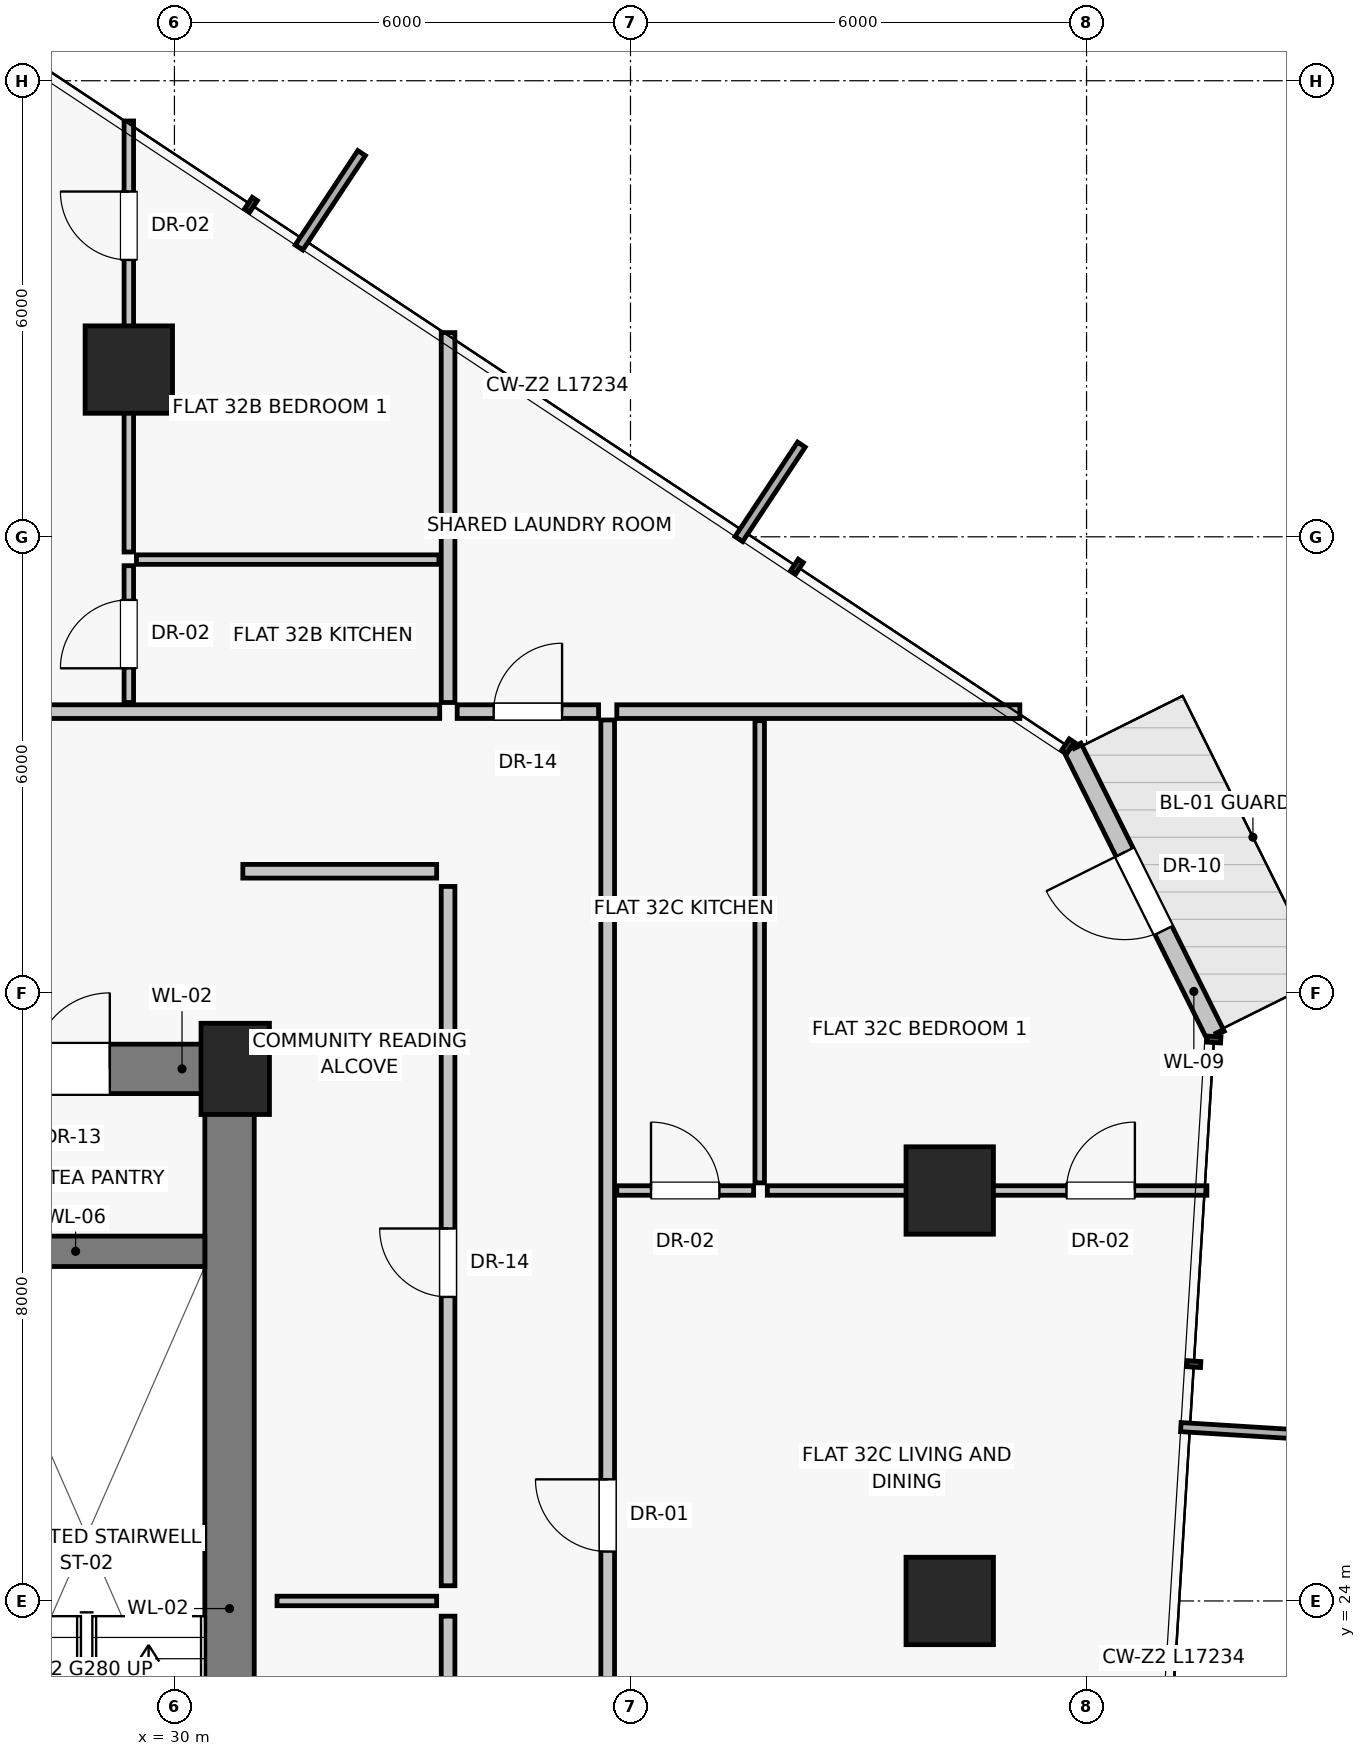
"""IFC4 building model, lengths in metres.
Left out: names, types, materials, properties, quantities, classifications, styles, units other than length and angle.
Written with IfcOpenShell. Run it as: python <this file> out.ifc"""

import sys

from ifc_helpers import new_model, si_unit, direction, frame, frame_2d, origin, origin_2d, place, context, subcontext, project, spatial, rectangle, extrude, source, transform, mapped, element, fill, save


model = new_model("IFC4")
c1 = context("Model", 3, precision=1e-05, world=origin(), true_north=direction((0.0, 1.0)))
c2 = subcontext(c1, "Body", "Model", "MODEL_VIEW")
j1 = project(units=[si_unit("LENGTHUNIT", "METRE"), si_unit("PLANEANGLEUNIT", "RADIAN")], contexts=[c1])
p1 = place(None, origin())
s1 = spatial("IfcSite", under=j1, at=p1, CompositionType="ELEMENT")
p2 = place(p1, origin())
s2 = spatial("IfcBuilding", under=s1, at=p2, CompositionType="ELEMENT")
p3 = place(p2, frame((0.0, 0.0, 116.5)))
s3 = spatial("IfcBuildingStorey", under=s2, at=p3, CompositionType="ELEMENT", Elevation=116.5)
p4 = place(p3, frame((30.8, 31.0, 0.0), z_axis=(0.0, 0.0, 1.0), x_axis=(1.0, 0.0, 0.0)))
e1 = element("IfcColumn", 1, at=p4, inside=s3, PredefinedType="PILASTER", context=c2, shape_type="SweptSolid", body=[
    extrude(rectangle(XDim=0.9, YDim=1.2, at=origin_2d()), origin(), (0.0, 0.0, 1.0), 3.25),
])
for number, where, z_axis, x_axis in (
    (2, (40.2, 24.0, 0.0), (0.0, 0.0, 1.0), (1.0, 0.0, 0.0)),
    (3, (40.2, 29.4, 0.0), (0.0, 0.0, 1.0), (1.0, 0.0, 0.0)),
    (4, (29.4, 40.2, 0.0), (0.0, 0.0, 1.0), (1.0, 0.0, 0.0)),
):
    element("IfcColumn", number, at=place(p3, frame(where, z_axis=z_axis, x_axis=x_axis)), inside=s3, PredefinedType="COLUMN", context=c2, shape_type="SweptSolid", body=[
        extrude(rectangle(XDim=1.15, YDim=1.15, at=origin_2d()), origin(), (0.0, 0.0, 1.0), 3.25),
    ])
p5 = place(p3, frame((43.699, 31.44, 0.0), z_axis=(0.0, 0.0, 1.0), x_axis=(-0.445597963256, 0.895233184786, 0.0)))
e5 = element("IfcWall", 5, at=p5, inside=s3, PredefinedType="SOLIDWALL", context=c2, shape_type="SweptSolid", body=[
    extrude(rectangle(XDim=4.233, YDim=0.25, at=frame_2d((2.116, 0.0))), origin(), (0.0, 0.0, 1.0), 3.0),
])
p6 = place(p5, frame((1.542, 0.0, 0.0)))
e6 = element("IfcOpeningElement", 6, at=p6, cuts=e5, PredefinedType="OPENING", context=c2, shape_type="SweptSolid", body=[
    extrude(rectangle(XDim=1.15, YDim=2.25, at=frame_2d((0.575, 1.125))), frame((0.0, 0.135, 0.0), z_axis=(0.0, -1.0, 0.0), x_axis=(1.0, 0.0, 0.0)), (0.0, 0.0, 1.0), 0.27),
])
p7 = place(p3, frame((30.725, 16.8, 0.0), z_axis=(0.0, 0.0, 1.0), x_axis=(0.0, 1.0, 0.0)))
e7 = element("IfcWall", 7, at=p7, inside=s3, PredefinedType="SHEAR", context=c2, shape_type="SweptSolid", body=[
    extrude(rectangle(XDim=14.2, YDim=0.65, at=frame_2d((7.1, 0.0))), origin(), (0.0, 0.0, 1.0), 3.0),
])
p8 = place(p3, frame((27.0, 31.0, 0.0), z_axis=(0.0, 0.0, 1.0), x_axis=(1.0, 0.0, 0.0)))
e8 = element("IfcWall", 8, at=p8, inside=s3, PredefinedType="SHEAR", context=c2, shape_type="SweptSolid", body=[
    extrude(rectangle(XDim=3.8, YDim=0.65, at=frame_2d((1.9, 0.0))), origin(), (0.0, 0.0, 1.0), 3.0),
])
p9 = place(p8, frame((1.15, 0.0, 0.0)))
e9 = element("IfcOpeningElement", 9, at=p9, cuts=e8, PredefinedType="OPENING", context=c2, shape_type="SweptSolid", body=[
    extrude(rectangle(XDim=1.0, YDim=2.01, at=frame_2d((0.5, 1.005))), frame((0.0, 0.335, 0.0), z_axis=(0.0, -1.0, 0.0), x_axis=(1.0, 0.0, 0.0)), (0.0, 0.0, 1.0), 0.67),
])
p10 = place(p3, frame((27.0, 28.6, 0.0), z_axis=(0.0, 0.0, 1.0), x_axis=(1.0, 0.0, 0.0)))
e10 = element("IfcWall", 10, at=p10, inside=s3, PredefinedType="SHEAR", context=c2, shape_type="SweptSolid", body=[
    extrude(rectangle(XDim=3.4, YDim=0.4, at=frame_2d((1.7, 0.0))), origin(), (0.0, 0.0, 1.0), 3.0),
])
p11 = place(p3, frame((33.6, 14.4, 0.0), z_axis=(0.0, 0.0, 1.0), x_axis=(0.0, 1.0, 0.0)))
e11 = element("IfcWall", 11, at=p11, inside=s3, PredefinedType="PARTITIONING", context=c2, shape_type="SweptSolid", body=[
    extrude(rectangle(XDim=9.4, YDim=0.18, at=frame_2d((4.7, 0.0))), origin(), (0.0, 0.0, 1.0), 3.0),
])
p12 = place(p11, frame((3.8, 0.0, 0.0)))
e12 = element("IfcOpeningElement", 12, at=p12, cuts=e11, PredefinedType="OPENING", context=c2, shape_type="SweptSolid", body=[
    extrude(rectangle(XDim=0.9, YDim=2.01, at=frame_2d((0.45, 1.005))), frame((0.0, 0.1, 0.0), z_axis=(0.0, -1.0, 0.0), x_axis=(1.0, 0.0, 0.0)), (0.0, 0.0, 1.0), 0.2),
])
p13 = place(p3, frame((33.6, 24.2, 0.0), z_axis=(0.0, 0.0, 1.0), x_axis=(0.0, 1.0, 0.0)))
e13 = element("IfcWall", 13, at=p13, inside=s3, PredefinedType="PARTITIONING", context=c2, shape_type="SweptSolid", body=[
    extrude(rectangle(XDim=9.2, YDim=0.18, at=frame_2d((4.6, 0.0))), origin(), (0.0, 0.0, 1.0), 3.0),
])
p14 = place(p13, frame((3.8, 0.0, 0.0)))
e14 = element("IfcOpeningElement", 14, at=p14, cuts=e13, PredefinedType="OPENING", context=c2, shape_type="SweptSolid", body=[
    extrude(rectangle(XDim=0.9, YDim=2.01, at=frame_2d((0.45, 1.005))), frame((0.0, 0.1, 0.0), z_axis=(0.0, -1.0, 0.0), x_axis=(1.0, 0.0, 0.0)), (0.0, 0.0, 1.0), 0.2),
])
p15 = place(p3, frame((31.35, 24.0, 0.0), z_axis=(0.0, 0.0, 1.0), x_axis=(1.0, 0.0, 0.0)))
e15 = element("IfcWall", 15, at=p15, inside=s3, PredefinedType="PARTITIONING", context=c2, shape_type="SweptSolid", body=[
    extrude(rectangle(XDim=2.1, YDim=0.125, at=frame_2d((1.05, 0.0))), origin(), (0.0, 0.0, 1.0), 3.0),
])
p16 = place(p3, frame((30.9, 33.6, 0.0), z_axis=(0.0, 0.0, 1.0), x_axis=(1.0, 0.0, 0.0)))
e16 = element("IfcWall", 16, at=p16, inside=s3, PredefinedType="PARTITIONING", context=c2, shape_type="SweptSolid", body=[
    extrude(rectangle(XDim=2.55, YDim=0.18, at=frame_2d((1.275, 0.0))), origin(), (0.0, 0.0, 1.0), 3.0),
])
p17 = place(p3, frame((33.6, 35.82, 0.0), z_axis=(0.0, 0.0, 1.0), x_axis=(0.0, 1.0, 0.0)))
e17 = element("IfcWall", 17, at=p17, inside=s3, PredefinedType="PARTITIONING", context=c2, shape_type="SweptSolid", body=[
    extrude(rectangle(XDim=4.866, YDim=0.18, at=frame_2d((2.433, 0.0))), origin(), (0.0, 0.0, 1.0), 3.0),
])
p18 = place(p3, frame((18.71, 35.7, 0.0), z_axis=(0.0, 0.0, 1.0), x_axis=(1.0, 0.0, 0.0)))
e18 = element("IfcWall", 18, at=p18, inside=s3, PredefinedType="PARTITIONING", context=c2, shape_type="SweptSolid", body=[
    extrude(rectangle(XDim=14.78, YDim=0.18, at=frame_2d((7.39, 0.0))), origin(), (0.0, 0.0, 1.0), 2.58),
])
p19 = place(p18, frame((5.94, 0.0, 0.0)))
e19 = element("IfcOpeningElement", 19, at=p19, cuts=e18, PredefinedType="OPENING", context=c2, shape_type="SweptSolid", body=[
    extrude(rectangle(XDim=0.95, YDim=2.02, at=frame_2d((0.475, 1.01))), frame((0.0, 0.1, 0.0), z_axis=(0.0, -1.0, 0.0), x_axis=(1.0, 0.0, 0.0)), (0.0, 0.0, 1.0), 0.2),
])
p20 = place(p3, frame((29.4, 35.82, 0.0), z_axis=(0.0, 0.0, 1.0), x_axis=(0.0, 1.0, 0.0)))
e20 = element("IfcWall", 20, at=p20, inside=s3, PredefinedType="PARTITIONING", context=c2, shape_type="SweptSolid", body=[
    extrude(rectangle(XDim=1.8, YDim=0.125, at=frame_2d((0.9, 0.0))), origin(), (0.0, 0.0, 1.0), 2.378),
])
p21 = place(p20, frame((0.45, 0.0, 0.0)))
e21 = element("IfcOpeningElement", 21, at=p21, cuts=e20, PredefinedType="OPENING", context=c2, shape_type="SweptSolid", body=[
    extrude(rectangle(XDim=0.9, YDim=2.01, at=frame_2d((0.45, 1.005))), frame((0.0, 0.073, 0.0), z_axis=(0.0, -1.0, 0.0), x_axis=(1.0, 0.0, 0.0)), (0.0, 0.0, 1.0), 0.145),
])
p22 = place(p3, frame((29.5, 37.7, 0.0), z_axis=(0.0, 0.0, 1.0), x_axis=(1.0, 0.0, 0.0)))
e22 = element("IfcWall", 22, at=p22, inside=s3, PredefinedType="PARTITIONING", context=c2, shape_type="SweptSolid", body=[
    extrude(rectangle(XDim=3.98, YDim=0.125, at=frame_2d((1.99, 0.0))), origin(), (0.0, 0.0, 1.0), 3.0),
])
p23 = place(p3, frame((29.4, 37.8, 0.0), z_axis=(0.0, 0.0, 1.0), x_axis=(0.0, 1.0, 0.0)))
e23 = element("IfcWall", 23, at=p23, inside=s3, PredefinedType="PARTITIONING", context=c2, shape_type="SweptSolid", body=[
    extrude(rectangle(XDim=5.671, YDim=0.125, at=frame_2d((2.835, 0.0))), origin(), (0.0, 0.0, 1.0), 2.378),
])
p24 = place(p23, frame((3.842, 0.0, 0.0)))
e24 = element("IfcOpeningElement", 24, at=p24, cuts=e23, PredefinedType="OPENING", context=c2, shape_type="SweptSolid", body=[
    extrude(rectangle(XDim=0.9, YDim=2.01, at=frame_2d((0.45, 1.005))), frame((0.0, 0.073, 0.0), z_axis=(0.0, -1.0, 0.0), x_axis=(1.0, 0.0, 0.0)), (0.0, 0.0, 1.0), 0.145),
])
p25 = place(p3, frame((35.82, 35.7, 0.0), z_axis=(0.0, 0.0, 1.0), x_axis=(1.0, 0.0, 0.0)))
e25 = element("IfcWall", 25, at=p25, inside=s3, PredefinedType="PARTITIONING", context=c2, shape_type="SweptSolid", body=[
    extrude(rectangle(XDim=5.302, YDim=0.18, at=frame_2d((2.651, 0.0))), origin(), (0.0, 0.0, 1.0), 3.0),
])
p26 = place(p3, frame((35.7, 18.71, 0.0), z_axis=(0.0, 0.0, 1.0), x_axis=(0.0, 1.0, 0.0)))
e26 = element("IfcWall", 26, at=p26, inside=s3, PredefinedType="PARTITIONING", context=c2, shape_type="SweptSolid", body=[
    extrude(rectangle(XDim=16.88, YDim=0.18, at=frame_2d((8.44, 0.0))), origin(), (0.0, 0.0, 1.0), 2.58),
])
p27 = place(p26, frame((5.94, 0.0, 0.0)))
e27 = element("IfcOpeningElement", 27, at=p27, cuts=e26, PredefinedType="OPENING", context=c2, shape_type="SweptSolid", body=[
    extrude(rectangle(XDim=0.95, YDim=2.02, at=frame_2d((0.475, 1.01))), frame((0.0, 0.1, 0.0), z_axis=(0.0, -1.0, 0.0), x_axis=(1.0, 0.0, 0.0)), (0.0, 0.0, 1.0), 0.2),
])
p28 = place(p3, frame((35.82, 29.4, 0.0), z_axis=(0.0, 0.0, 1.0), x_axis=(1.0, 0.0, 0.0)))
e28 = element("IfcWall", 28, at=p28, inside=s3, PredefinedType="PARTITIONING", context=c2, shape_type="SweptSolid", body=[
    extrude(rectangle(XDim=1.8, YDim=0.125, at=frame_2d((0.9, 0.0))), origin(), (0.0, 0.0, 1.0), 2.378),
])
p29 = place(p28, frame((0.45, 0.0, 0.0)))
e29 = element("IfcOpeningElement", 29, at=p29, cuts=e28, PredefinedType="OPENING", context=c2, shape_type="SweptSolid", body=[
    extrude(rectangle(XDim=0.9, YDim=2.01, at=frame_2d((0.45, 1.005))), frame((0.0, 0.073, 0.0), z_axis=(0.0, -1.0, 0.0), x_axis=(1.0, 0.0, 0.0)), (0.0, 0.0, 1.0), 0.145),
])
p30 = place(p3, frame((37.7, 29.5, 0.0), z_axis=(0.0, 0.0, 1.0), x_axis=(0.0, 1.0, 0.0)))
e30 = element("IfcWall", 30, at=p30, inside=s3, PredefinedType="PARTITIONING", context=c2, shape_type="SweptSolid", body=[
    extrude(rectangle(XDim=6.08, YDim=0.125, at=frame_2d((3.04, 0.0))), origin(), (0.0, 0.0, 1.0), 3.0),
])
p31 = place(p3, frame((37.8, 29.4, 0.0), z_axis=(0.0, 0.0, 1.0), x_axis=(1.0, 0.0, 0.0)))
e31 = element("IfcWall", 31, at=p31, inside=s3, PredefinedType="PARTITIONING", context=c2, shape_type="SweptSolid", body=[
    extrude(rectangle(XDim=5.783, YDim=0.125, at=frame_2d((2.892, 0.0))), origin(), (0.0, 0.0, 1.0), 2.378),
])
p32 = place(p31, frame((3.936, 0.0, 0.0)))
e32 = element("IfcOpeningElement", 32, at=p32, cuts=e31, PredefinedType="OPENING", context=c2, shape_type="SweptSolid", body=[
    extrude(rectangle(XDim=0.9, YDim=2.01, at=frame_2d((0.45, 1.005))), frame((0.0, 0.073, 0.0), z_axis=(0.0, -1.0, 0.0), x_axis=(1.0, 0.0, 0.0)), (0.0, 0.0, 1.0), 0.145),
])
p33 = place(p3, frame((33.72, 35.7, 0.0), z_axis=(0.0, 0.0, 1.0), x_axis=(1.0, 0.0, 0.0)))
e33 = element("IfcWall", 33, at=p33, inside=s3, PredefinedType="PARTITIONING", context=c2, shape_type="SweptSolid", body=[
    extrude(rectangle(XDim=1.86, YDim=0.18, at=frame_2d((0.93, 0.0))), origin(), (0.0, 0.0, 1.0), 3.0),
])
p34 = place(p33, frame((0.48, 0.0, 0.0)))
e34 = element("IfcOpeningElement", 34, at=p34, cuts=e33, PredefinedType="OPENING", context=c2, shape_type="SweptSolid", body=[
    extrude(rectangle(XDim=0.9, YDim=2.01, at=frame_2d((0.45, 1.005))), frame((0.0, 0.1, 0.0), z_axis=(0.0, -1.0, 0.0), x_axis=(1.0, 0.0, 0.0)), (0.0, 0.0, 1.0), 0.2),
])
m1 = source(origin(), c2, "Body", "SweptSolid", [
    extrude(rectangle(XDim=1.15, YDim=2.25, at=frame_2d((0.575, 1.125))), frame((0.0, 0.025, 0.0), z_axis=(0.0, -1.0, 0.0), x_axis=(1.0, 0.0, 0.0)), (0.0, 0.0, 1.0), 0.05),
])
p35 = place(p6, frame((1.15, 0.0, 0.0), z_axis=(0.0, 0.0, 1.0), x_axis=(-1.0, 0.0, 0.0)))
e35 = element("IfcDoor", 35, at=p35, inside=s3, OperationType="SINGLE_SWING_RIGHT", PredefinedType="DOOR", context=c2, shape_type="MappedRepresentation", body=[
    mapped(m1, transform((0.0, 0.0, 0.0), scale=1.0)),
])
fill(e6, e35)
m2 = source(origin(), c2, "Body", "SweptSolid", [
    extrude(rectangle(XDim=1.0, YDim=2.01, at=frame_2d((0.5, 1.005))), frame((0.0, 0.025, 0.0), z_axis=(0.0, -1.0, 0.0), x_axis=(1.0, 0.0, 0.0)), (0.0, 0.0, 1.0), 0.05),
])
p36 = place(p9, origin())
e36 = element("IfcDoor", 36, at=p36, inside=s3, OperationType="SINGLE_SWING_RIGHT", PredefinedType="DOOR", context=c2, shape_type="MappedRepresentation", body=[
    mapped(m2, transform((0.0, 0.0, 0.0), scale=1.0)),
])
fill(e9, e36)
m3 = source(origin(), c2, "Body", "SweptSolid", [
    extrude(rectangle(XDim=0.9, YDim=2.01, at=frame_2d((0.45, 1.005))), frame((0.0, 0.025, 0.0), z_axis=(0.0, -1.0, 0.0), x_axis=(1.0, 0.0, 0.0)), (0.0, 0.0, 1.0), 0.05),
])
p37 = place(p14, origin())
e37 = element("IfcDoor", 37, at=p37, inside=s3, OperationType="SINGLE_SWING_RIGHT", PredefinedType="DOOR", context=c2, shape_type="MappedRepresentation", body=[
    mapped(m3, transform((0.0, 0.0, 0.0), scale=1.0)),
])
fill(e14, e37)
p38 = place(p21, origin())
e38 = element("IfcDoor", 38, at=p38, inside=s3, OperationType="SINGLE_SWING_LEFT", PredefinedType="DOOR", context=c2, shape_type="MappedRepresentation", body=[
    mapped(m3, transform((0.0, 0.0, 0.0), scale=1.0)),
])
fill(e21, e38)
p39 = place(p24, origin())
e39 = element("IfcDoor", 39, at=p39, inside=s3, OperationType="SINGLE_SWING_RIGHT", PredefinedType="DOOR", context=c2, shape_type="MappedRepresentation", body=[
    mapped(m3, transform((0.0, 0.0, 0.0), scale=1.0)),
])
fill(e24, e39)
m4 = source(origin(), c2, "Body", "SweptSolid", [
    extrude(rectangle(XDim=0.95, YDim=2.02, at=frame_2d((0.475, 1.01))), frame((0.0, 0.025, 0.0), z_axis=(0.0, -1.0, 0.0), x_axis=(1.0, 0.0, 0.0)), (0.0, 0.0, 1.0), 0.05),
])
p40 = place(p27, origin())
e40 = element("IfcDoor", 40, at=p40, inside=s3, OperationType="SINGLE_SWING_RIGHT", PredefinedType="DOOR", context=c2, shape_type="MappedRepresentation", body=[
    mapped(m4, transform((0.0, 0.0, 0.0), scale=1.0)),
])
fill(e27, e40)
p41 = place(p29, origin())
e41 = element("IfcDoor", 41, at=p41, inside=s3, OperationType="SINGLE_SWING_LEFT", PredefinedType="DOOR", context=c2, shape_type="MappedRepresentation", body=[
    mapped(m3, transform((0.0, 0.0, 0.0), scale=1.0)),
])
fill(e29, e41)
p42 = place(p32, origin())
e42 = element("IfcDoor", 42, at=p42, inside=s3, OperationType="SINGLE_SWING_RIGHT", PredefinedType="DOOR", context=c2, shape_type="MappedRepresentation", body=[
    mapped(m3, transform((0.0, 0.0, 0.0), scale=1.0)),
])
fill(e32, e42)
p43 = place(p34, origin())
e43 = element("IfcDoor", 43, at=p43, inside=s3, OperationType="SINGLE_SWING_RIGHT", PredefinedType="DOOR", context=c2, shape_type="MappedRepresentation", body=[
    mapped(m3, transform((0.0, 0.0, 0.0), scale=1.0)),
])
fill(e34, e43)
save(model, sys.argv[1])
